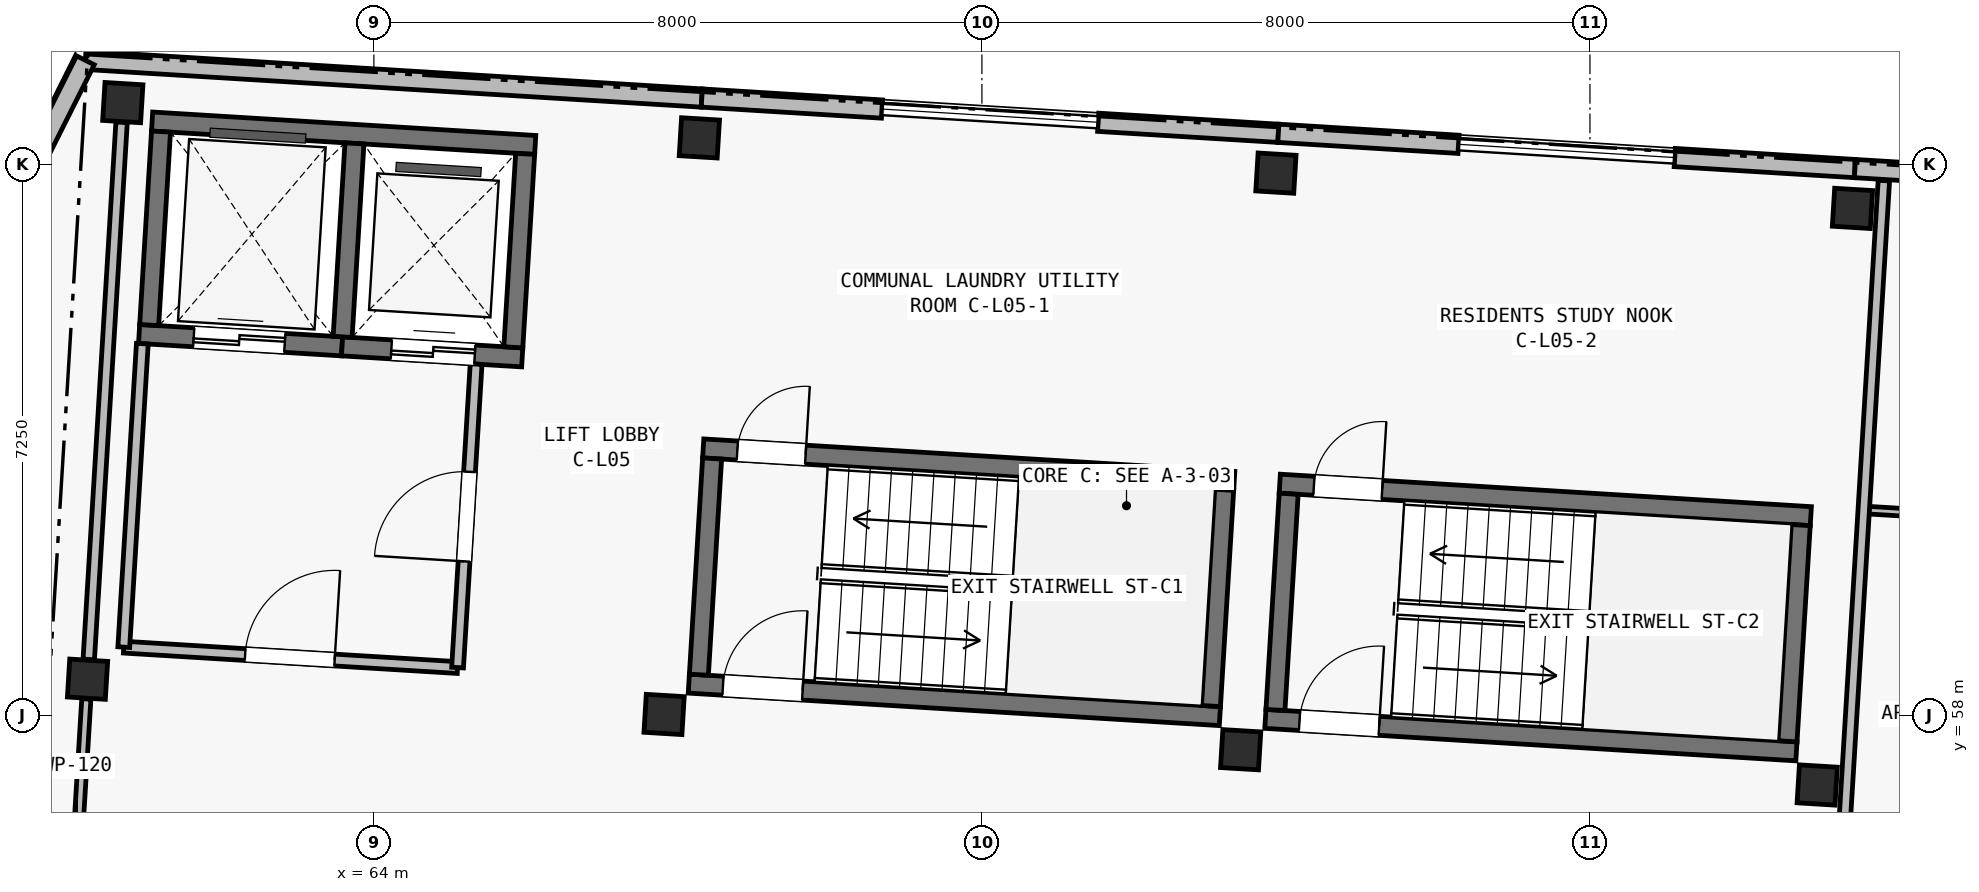
"""IFC4 building model, lengths in metres.
Left out: names, types, materials, properties, quantities, classifications, styles, units other than length and angle.
Written with IfcOpenShell. Run it as: python <this file> out.ifc"""

import sys

from ifc_helpers import new_model, si_unit, direction, frame, frame_2d, origin, origin_2d, place, context, subcontext, project, spatial, rectangle, extrude, element, fill, save


model = new_model("IFC4")
c1 = context("Model", 3, precision=1e-05, world=origin(), true_north=direction((0.0, 1.0)))
c2 = subcontext(c1, "Body", "Model", "MODEL_VIEW")
j1 = project(units=[si_unit("LENGTHUNIT", "METRE"), si_unit("PLANEANGLEUNIT", "RADIAN")], contexts=[c1])
p1 = place(None, origin())
s1 = spatial("IfcSite", under=j1, at=p1, CompositionType="ELEMENT")
p2 = place(p1, origin())
s2 = spatial("IfcBuilding", under=s1, at=p2, CompositionType="ELEMENT")
p3 = place(p2, frame((0.0, 0.0, 18.15)))
s3 = spatial("IfcBuildingStorey", under=s2, at=p3, CompositionType="ELEMENT", Elevation=18.15)
for number, where, z_axis, x_axis in (
    (1, (60.233, 58.478, 0.0), (0.0, 0.0, 1.0), (0.998, -0.061, 0.0)),
    (2, (60.697, 66.063, 0.0), (0.0, 0.0, 1.0), (0.998, -0.061, 0.0)),
    (3, (67.818, 58.014, 0.0), (0.0, 0.0, 1.0), (0.998, -0.061, 0.0)),
    (4, (68.282, 65.599, 0.0), (0.0, 0.0, 1.0), (0.998, -0.061, 0.0)),
    (5, (75.404, 57.55, 0.0), (0.0, 0.0, 1.0), (0.998, -0.061, 0.0)),
    (6, (75.868, 65.135, 0.0), (0.0, 0.0, 1.0), (0.998, -0.061, 0.0)),
    (7, (82.99, 57.086, 0.0), (0.0, 0.0, 1.0), (0.998, -0.061, 0.0)),
    (8, (83.454, 64.672, 0.0), (0.0, 0.0, 1.0), (0.998, -0.061, 0.0)),
):
    element("IfcColumn", number, at=place(p3, frame(where, z_axis=z_axis, x_axis=x_axis)), inside=s3, PredefinedType="COLUMN", context=c2, shape_type="SweptSolid", body=[
        extrude(rectangle(XDim=0.5, YDim=0.5, at=origin_2d()), origin(), (0.0, 0.0, 1.0), 3.25),
    ])
p4 = place(p3, frame((61.082, 65.814, 0.0), z_axis=(0.0, 0.0, 1.0), x_axis=(0.998134101522, -0.061059932685, 0.0)))
e9 = element("IfcWall", 9, at=p4, inside=s3, PredefinedType="SHEAR", context=c2, shape_type="SweptSolid", body=[
    extrude(rectangle(XDim=5.05, YDim=0.25, at=frame_2d((2.525, 0.0))), origin(), (0.0, 0.0, 1.0), 3.25),
])
p5 = place(p3, frame((60.911, 63.02, 0.0), z_axis=(0.0, 0.0, 1.0), x_axis=(0.998134099905, -0.061059959111, 0.0)))
e10 = element("IfcWall", 10, at=p5, inside=s3, PredefinedType="SHEAR", context=c2, shape_type="SweptSolid", body=[
    extrude(rectangle(XDim=2.675, YDim=0.25, at=frame_2d((1.337, 0.0))), origin(), (0.0, 0.0, 1.0), 3.25),
])
p6 = place(p5, frame((0.72, 0.0, 0.0)))
e11 = element("IfcOpeningElement", 11, at=p6, cuts=e10, PredefinedType="OPENING", context=c2, shape_type="SweptSolid", body=[
    extrude(rectangle(XDim=1.2, YDim=2.2, at=frame_2d((0.6, 1.1))), frame((0.0, 0.14, 0.0), z_axis=(0.0, -1.0, 0.0), x_axis=(1.0, 0.0, 0.0)), (0.0, 0.0, 1.0), 0.28),
])
p7 = place(p3, frame((63.581, 62.856, 0.0), z_axis=(0.0, 0.0, 1.0), x_axis=(0.998134103342, -0.061059902923, 0.0)))
e12 = element("IfcWall", 12, at=p7, inside=s3, PredefinedType="SHEAR", context=c2, shape_type="SweptSolid", body=[
    extrude(rectangle(XDim=2.375, YDim=0.25, at=frame_2d((1.188, 0.0))), origin(), (0.0, 0.0, 1.0), 3.25),
])
p8 = place(p7, frame((0.65, 0.0, 0.0)))
e13 = element("IfcOpeningElement", 13, at=p8, cuts=e12, PredefinedType="OPENING", context=c2, shape_type="SweptSolid", body=[
    extrude(rectangle(XDim=1.1, YDim=2.15, at=frame_2d((0.55, 1.075))), frame((0.0, 0.14, 0.0), z_axis=(0.0, -1.0, 0.0), x_axis=(1.0, 0.0, 0.0)), (0.0, 0.0, 1.0), 0.28),
])
p9 = place(p3, frame((61.043, 63.137, 0.0), z_axis=(0.0, 0.0, 1.0), x_axis=(0.061078919587, 0.998132939834, 0.0)))
e14 = element("IfcWall", 14, at=p9, inside=s3, PredefinedType="SHEAR", context=c2, shape_type="SweptSolid", body=[
    extrude(rectangle(XDim=2.55, YDim=0.25, at=frame_2d((1.275, 0.0))), origin(), (0.0, 0.0, 1.0), 3.25),
])
p10 = place(p3, frame((63.589, 62.981, 0.0), z_axis=(0.0, 0.0, 1.0), x_axis=(0.060989368901, 0.998138415692, 0.0)))
e15 = element("IfcWall", 15, at=p10, inside=s3, PredefinedType="SHEAR", context=c2, shape_type="SweptSolid", body=[
    extrude(rectangle(XDim=2.55, YDim=0.25, at=frame_2d((1.275, 0.0))), origin(), (0.0, 0.0, 1.0), 3.25),
])
p11 = place(p3, frame((65.834, 62.844, 0.0), z_axis=(0.0, 0.0, 1.0), x_axis=(0.061084756616, 0.998132582631, 0.0)))
e16 = element("IfcWall", 16, at=p11, inside=s3, PredefinedType="SHEAR", context=c2, shape_type="SweptSolid", body=[
    extrude(rectangle(XDim=2.55, YDim=0.25, at=frame_2d((1.275, 0.0))), origin(), (0.0, 0.0, 1.0), 3.25),
])
p12 = place(p3, frame((68.333, 61.514, 0.0), z_axis=(0.0, 0.0, 1.0), x_axis=(0.998135676081, -0.061034188237, 0.0)))
e17 = element("IfcWall", 17, at=p12, inside=s3, PredefinedType="SHEAR", context=c2, shape_type="SweptSolid", body=[
    extrude(rectangle(XDim=7.0, YDim=0.25, at=frame_2d((3.5, 0.0))), origin(), (0.0, 0.0, 1.0), 3.25),
])
p13 = place(p12, frame((0.45, 0.0, 0.0)))
e18 = element("IfcOpeningElement", 18, at=p13, cuts=e17, PredefinedType="OPENING", context=c2, shape_type="SweptSolid", body=[
    extrude(rectangle(XDim=0.9, YDim=2.1, at=frame_2d((0.45, 1.05))), frame((0.0, 0.14, 0.0), z_axis=(0.0, -1.0, 0.0), x_axis=(1.0, 0.0, 0.0)), (0.0, 0.0, 1.0), 0.28),
])
p14 = place(p3, frame((68.144, 58.419, 0.0), z_axis=(0.0, 0.0, 1.0), x_axis=(0.998135546153, -0.061036313012, 0.0)))
e19 = element("IfcWall", 19, at=p14, inside=s3, PredefinedType="SHEAR", context=c2, shape_type="SweptSolid", body=[
    extrude(rectangle(XDim=7.0, YDim=0.25, at=frame_2d((3.5, 0.0))), origin(), (0.0, 0.0, 1.0), 3.25),
])
p15 = place(p14, frame((0.45, 0.0, 0.0)))
e20 = element("IfcOpeningElement", 20, at=p15, cuts=e19, PredefinedType="OPENING", context=c2, shape_type="SweptSolid", body=[
    extrude(rectangle(XDim=1.05, YDim=2.15, at=frame_2d((0.525, 1.075))), frame((0.0, 0.14, 0.0), z_axis=(0.0, -1.0, 0.0), x_axis=(1.0, 0.0, 0.0)), (0.0, 0.0, 1.0), 0.28),
])
for number, where, z_axis, x_axis in (
    (21, (68.276, 58.537, 0.0), (0.0, 0.0, 1.0), (0.061, 0.998, 0.0)),
    (22, (75.014, 58.125, 0.0), (0.0, 0.0, 1.0), (0.061, 0.998, 0.0)),
):
    element("IfcWall", number, at=place(p3, frame(where, z_axis=z_axis, x_axis=x_axis)), inside=s3, PredefinedType="SHEAR", context=c2, shape_type="SweptSolid", body=[
        extrude(rectangle(XDim=2.85, YDim=0.25, at=frame_2d((1.425, 0.0))), origin(), (0.0, 0.0, 1.0), 3.25),
    ])
p16 = place(p3, frame((75.919, 61.05, 0.0), z_axis=(0.0, 0.0, 1.0), x_axis=(0.998135546153, -0.061036313012, 0.0)))
e23 = element("IfcWall", 23, at=p16, inside=s3, PredefinedType="SHEAR", context=c2, shape_type="SweptSolid", body=[
    extrude(rectangle(XDim=7.0, YDim=0.25, at=frame_2d((3.5, 0.0))), origin(), (0.0, 0.0, 1.0), 3.25),
])
p17 = place(p16, frame((0.45, 0.0, 0.0)))
e24 = element("IfcOpeningElement", 24, at=p17, cuts=e23, PredefinedType="OPENING", context=c2, shape_type="SweptSolid", body=[
    extrude(rectangle(XDim=0.9, YDim=2.1, at=frame_2d((0.45, 1.05))), frame((0.0, 0.14, 0.0), z_axis=(0.0, -1.0, 0.0), x_axis=(1.0, 0.0, 0.0)), (0.0, 0.0, 1.0), 0.28),
])
p18 = place(p3, frame((75.73, 57.956, 0.0), z_axis=(0.0, 0.0, 1.0), x_axis=(0.998135546153, -0.061036313012, 0.0)))
e25 = element("IfcWall", 25, at=p18, inside=s3, PredefinedType="SHEAR", context=c2, shape_type="SweptSolid", body=[
    extrude(rectangle(XDim=7.0, YDim=0.25, at=frame_2d((3.5, 0.0))), origin(), (0.0, 0.0, 1.0), 3.25),
])
p19 = place(p18, frame((0.45, 0.0, 0.0)))
e26 = element("IfcOpeningElement", 26, at=p19, cuts=e25, PredefinedType="OPENING", context=c2, shape_type="SweptSolid", body=[
    extrude(rectangle(XDim=1.05, YDim=2.15, at=frame_2d((0.525, 1.075))), frame((0.0, 0.14, 0.0), z_axis=(0.0, -1.0, 0.0), x_axis=(1.0, 0.0, 0.0)), (0.0, 0.0, 1.0), 0.28),
])
for number, where, z_axis, x_axis in (
    (27, (75.862, 58.073, 0.0), (0.0, 0.0, 1.0), (0.061, 0.998, 0.0)),
    (28, (82.599, 57.661, 0.0), (0.0, 0.0, 1.0), (0.061, 0.998, 0.0)),
):
    element("IfcWall", number, at=place(p3, frame(where, z_axis=z_axis, x_axis=x_axis)), inside=s3, PredefinedType="SHEAR", context=c2, shape_type="SweptSolid", body=[
        extrude(rectangle(XDim=2.85, YDim=0.25, at=frame_2d((1.425, 0.0))), origin(), (0.0, 0.0, 1.0), 3.25),
    ])
p20 = place(p3, frame((60.205, 66.62, 0.0), z_axis=(0.0, 0.0, 1.0), x_axis=(0.998134248939, -0.061057522844, 0.0)))
e29 = element("IfcWall", 29, at=p20, inside=s3, PredefinedType="SOLIDWALL", context=c2, shape_type="SweptSolid", body=[
    extrude(rectangle(XDim=8.125, YDim=0.24, at=frame_2d((4.062, 0.0))), origin(), (0.0, 0.0, 1.0), 3.0),
])
p21 = place(p3, frame((68.314, 66.124, 0.0), z_axis=(0.0, 0.0, 1.0), x_axis=(0.998134103342, -0.061059902923, 0.0)))
e30 = element("IfcWall", 30, at=p21, inside=s3, PredefinedType="SOLIDWALL", context=c2, shape_type="SweptSolid", body=[
    extrude(rectangle(XDim=2.375, YDim=0.24, at=frame_2d((1.188, 0.0))), origin(), (0.0, 0.0, 1.0), 3.0),
])
p22 = place(p3, frame((73.53, 65.804, 0.0), z_axis=(0.0, 0.0, 1.0), x_axis=(0.998133720034, -0.061066168473, 0.0)))
e31 = element("IfcWall", 31, at=p22, inside=s3, PredefinedType="SOLIDWALL", context=c2, shape_type="SweptSolid", body=[
    extrude(rectangle(XDim=2.375, YDim=0.24, at=frame_2d((1.188, 0.0))), origin(), (0.0, 0.0, 1.0), 3.0),
])
for number, where, z_axis, x_axis in (
    (32, (75.9, 65.659, 0.0), (0.0, 0.0, 1.0), (0.998, -0.061, 0.0)),
    (33, (81.115, 65.341, 0.0), (0.0, 0.0, 1.0), (0.998, -0.061, 0.0)),
):
    element("IfcWall", number, at=place(p3, frame(where, z_axis=z_axis, x_axis=x_axis)), inside=s3, PredefinedType="SOLIDWALL", context=c2, shape_type="SweptSolid", body=[
        extrude(rectangle(XDim=2.375, YDim=0.24, at=frame_2d((1.188, 0.0))), origin(), (0.0, 0.0, 1.0), 3.0),
    ])
p23 = place(p3, frame((83.486, 65.196, 0.0), z_axis=(0.0, 0.0, 1.0), x_axis=(0.998135669243, -0.061034300063, 0.0)))
e34 = element("IfcWall", 34, at=p23, inside=s3, PredefinedType="SOLIDWALL", context=c2, shape_type="SweptSolid", body=[
    extrude(rectangle(XDim=7.6, YDim=0.24, at=frame_2d((3.8, 0.0))), origin(), (0.0, 0.0, 1.0), 3.0),
])
p24 = place(p23, frame((1.807, 0.0, 0.44)))
e35 = element("IfcOpeningElement", 35, at=p24, cuts=e34, PredefinedType="OPENING", context=c2, shape_type="SweptSolid", body=[
    extrude(rectangle(XDim=0.74, YDim=2.26, at=frame_2d((0.37, 1.13))), frame((0.0, 0.135, 0.0), z_axis=(0.0, -1.0, 0.0), x_axis=(1.0, 0.0, 0.0)), (0.0, 0.0, 1.0), 0.27),
])
p25 = place(p23, frame((5.006, 0.0, 0.5)))
e36 = element("IfcOpeningElement", 36, at=p25, cuts=e34, PredefinedType="OPENING", context=c2, shape_type="SweptSolid", body=[
    extrude(rectangle(XDim=0.82, YDim=2.18, at=frame_2d((0.41, 1.09))), frame((0.0, 0.135, 0.0), z_axis=(0.0, -1.0, 0.0), x_axis=(1.0, 0.0, 0.0)), (0.0, 0.0, 1.0), 0.27),
])
p26 = place(p3, frame((51.654, 49.585, 0.0), z_axis=(0.0, 0.0, 1.0), x_axis=(0.448621989068, 0.893721607059, 0.0)))
e37 = element("IfcWall", 37, at=p26, inside=s3, PredefinedType="SOLIDWALL", context=c2, shape_type="SweptSolid", body=[
    extrude(rectangle(XDim=19.061, YDim=0.26, at=frame_2d((9.53, 0.0))), origin(), (0.0, 0.0, 1.0), 3.0),
])
p27 = place(p26, frame((2.63, 0.0, 0.52)))
e38 = element("IfcOpeningElement", 38, at=p27, cuts=e37, PredefinedType="OPENING", context=c2, shape_type="SweptSolid", body=[
    extrude(rectangle(XDim=0.82, YDim=2.18, at=frame_2d((0.41, 1.09))), frame((0.0, 0.145, 0.0), z_axis=(0.0, -1.0, 0.0), x_axis=(1.0, 0.0, 0.0)), (0.0, 0.0, 1.0), 0.29),
])
p28 = place(p26, frame((15.41, 0.0, 0.45)))
e39 = element("IfcOpeningElement", 39, at=p28, cuts=e37, PredefinedType="OPENING", context=c2, shape_type="SweptSolid", body=[
    extrude(rectangle(XDim=0.66, YDim=2.32, at=frame_2d((0.33, 1.16))), frame((0.0, 0.145, 0.0), z_axis=(0.0, -1.0, 0.0), x_axis=(1.0, 0.0, 0.0)), (0.0, 0.0, 1.0), 0.29),
])
p29 = place(p3, frame((60.709, 58.899, 0.0), z_axis=(0.0, 0.0, 1.0), x_axis=(0.998132276607, -0.061089756882, 0.0)))
e40 = element("IfcWall", 40, at=p29, inside=s3, PredefinedType="PARTITIONING", context=c2, shape_type="SweptSolid", body=[
    extrude(rectangle(XDim=4.4, YDim=0.155, at=frame_2d((2.2, 0.0))), origin(), (0.0, 0.0, 1.0), 2.97),
])
p30 = place(p29, frame((1.6, 0.0, 0.0)))
e41 = element("IfcOpeningElement", 41, at=p30, cuts=e40, PredefinedType="OPENING", context=c2, shape_type="SweptSolid", body=[
    extrude(rectangle(XDim=1.18, YDim=2.15, at=frame_2d((0.59, 1.075))), frame((0.0, 0.093, 0.0), z_axis=(0.0, -1.0, 0.0), x_axis=(1.0, 0.0, 0.0)), (0.0, 0.0, 1.0), 0.185),
])
p31 = place(p3, frame((60.709, 58.899, 0.0), z_axis=(0.0, 0.0, 1.0), x_axis=(0.061036844229, 0.998135513669, 0.0)))
e42 = element("IfcWall", 42, at=p31, inside=s3, PredefinedType="PARTITIONING", context=c2, shape_type="SweptSolid", body=[
    extrude(rectangle(XDim=4.0, YDim=0.155, at=frame_2d((2.0, 0.0))), origin(), (0.0, 0.0, 1.0), 2.97),
])
p32 = place(p3, frame((65.101, 58.631, 0.0), z_axis=(0.0, 0.0, 1.0), x_axis=(0.061033125904, 0.99813574104, 0.0)))
e43 = element("IfcWall", 43, at=p32, inside=s3, PredefinedType="PARTITIONING", context=c2, shape_type="SweptSolid", body=[
    extrude(rectangle(XDim=4.0, YDim=0.155, at=frame_2d((2.0, 0.0))), origin(), (0.0, 0.0, 1.0), 2.97),
])
p33 = place(p32, frame((1.4, 0.0, 0.0)))
e44 = element("IfcOpeningElement", 44, at=p33, cuts=e43, PredefinedType="OPENING", context=c2, shape_type="SweptSolid", body=[
    extrude(rectangle(XDim=1.18, YDim=2.15, at=frame_2d((0.59, 1.075))), frame((0.0, 0.093, 0.0), z_axis=(0.0, -1.0, 0.0), x_axis=(1.0, 0.0, 0.0)), (0.0, 0.0, 1.0), 0.185),
])
p34 = place(p3, frame((59.98, 54.345, 0.0), z_axis=(0.0, 0.0, 1.0), x_axis=(0.061101107425, 0.998131581843, 0.0)))
e45 = element("IfcWall", 45, at=p34, inside=s3, PredefinedType="PARTITIONING", context=c2, shape_type="SweptSolid", body=[
    extrude(rectangle(XDim=3.88, YDim=0.12, at=frame_2d((1.94, 0.0))), origin(), (0.0, 0.0, 1.0), 2.5),
])
p35 = place(p34, frame((1.35, 0.0, 0.0)))
e46 = element("IfcOpeningElement", 46, at=p35, cuts=e45, PredefinedType="OPENING", context=c2, shape_type="SweptSolid", body=[
    extrude(rectangle(XDim=0.9, YDim=2.1, at=frame_2d((0.45, 1.05))), frame((0.0, 0.075, 0.0), z_axis=(0.0, -1.0, 0.0), x_axis=(1.0, 0.0, 0.0)), (0.0, 0.0, 1.0), 0.15),
])
p36 = place(p3, frame((60.249, 58.737, 0.0), z_axis=(0.0, 0.0, 1.0), x_axis=(0.061034344288, 0.998135666539, 0.0)))
e47 = element("IfcWall", 47, at=p36, inside=s3, PredefinedType="PARTITIONING", context=c2, shape_type="SweptSolid", body=[
    extrude(rectangle(XDim=7.08, YDim=0.15, at=frame_2d((3.54, 0.0))), origin(), (0.0, 0.0, 1.0), 2.5),
])
p37 = place(p3, frame((83.602, 60.705, 0.0), z_axis=(0.0, 0.0, 1.0), x_axis=(0.998133617109, -0.061067850767, 0.0)))
e48 = element("IfcWall", 48, at=p37, inside=s3, PredefinedType="PARTITIONING", context=c2, shape_type="SweptSolid", body=[
    extrude(rectangle(XDim=3.41, YDim=0.1, at=frame_2d((1.705, 0.0))), origin(), (0.0, 0.0, 1.0), 2.97),
])
p38 = place(p37, frame((1.255, 0.0, 0.0)))
e49 = element("IfcOpeningElement", 49, at=p38, cuts=e48, PredefinedType="OPENING", context=c2, shape_type="SweptSolid", body=[
    extrude(rectangle(XDim=0.88, YDim=2.1, at=frame_2d((0.44, 1.05))), frame((0.0, 0.065, 0.0), z_axis=(0.0, -1.0, 0.0), x_axis=(1.0, 0.0, 0.0)), (0.0, 0.0, 1.0), 0.13),
])
p39 = place(p3, frame((83.265, 55.185, 0.0), z_axis=(0.0, 0.0, 1.0), x_axis=(0.061046193261, 0.998134941923, 0.0)))
e50 = element("IfcWall", 50, at=p39, inside=s3, PredefinedType="PARTITIONING", context=c2, shape_type="SweptSolid", body=[
    extrude(rectangle(XDim=9.87, YDim=0.15, at=frame_2d((4.935, 0.0))), origin(), (0.0, 0.0, 1.0), 2.97),
])
p40 = place(p30, origin())
e51 = element("IfcDoor", 51, at=p40, inside=s3, OperationType="SINGLE_SWING_RIGHT", PredefinedType="DOOR", context=c2, shape_type="SweptSolid", body=[
    extrude(rectangle(XDim=1.18, YDim=2.15, at=frame_2d((0.59, 1.075))), frame((0.0, 0.025, 0.0), z_axis=(0.0, -1.0, 0.0), x_axis=(1.0, 0.0, 0.0)), (0.0, 0.0, 1.0), 0.05),
])
fill(e41, e51)
p41 = place(p33, origin())
e52 = element("IfcDoor", 52, at=p41, inside=s3, OperationType="SINGLE_SWING_LEFT", PredefinedType="DOOR", context=c2, shape_type="SweptSolid", body=[
    extrude(rectangle(XDim=1.18, YDim=2.15, at=frame_2d((0.59, 1.075))), frame((0.0, 0.025, 0.0), z_axis=(0.0, -1.0, 0.0), x_axis=(1.0, 0.0, 0.0)), (0.0, 0.0, 1.0), 0.05),
])
fill(e44, e52)
p42 = place(p15, origin())
e53 = element("IfcDoor", 53, at=p42, inside=s3, OperationType="SINGLE_SWING_RIGHT", PredefinedType="DOOR", context=c2, shape_type="SweptSolid", body=[
    extrude(rectangle(XDim=1.05, YDim=2.15, at=frame_2d((0.525, 1.075))), frame((0.0, 0.025, 0.0), z_axis=(0.0, -1.0, 0.0), x_axis=(1.0, 0.0, 0.0)), (0.0, 0.0, 1.0), 0.05),
])
fill(e20, e53)
p43 = place(p13, origin())
e54 = element("IfcDoor", 54, at=p43, inside=s3, OperationType="SINGLE_SWING_RIGHT", PredefinedType="DOOR", context=c2, shape_type="SweptSolid", body=[
    extrude(rectangle(XDim=0.9, YDim=2.1, at=frame_2d((0.45, 1.05))), frame((0.0, 0.025, 0.0), z_axis=(0.0, -1.0, 0.0), x_axis=(1.0, 0.0, 0.0)), (0.0, 0.0, 1.0), 0.05),
])
fill(e18, e54)
p44 = place(p19, origin())
e55 = element("IfcDoor", 55, at=p44, inside=s3, OperationType="SINGLE_SWING_RIGHT", PredefinedType="DOOR", context=c2, shape_type="SweptSolid", body=[
    extrude(rectangle(XDim=1.05, YDim=2.15, at=frame_2d((0.525, 1.075))), frame((0.0, 0.025, 0.0), z_axis=(0.0, -1.0, 0.0), x_axis=(1.0, 0.0, 0.0)), (0.0, 0.0, 1.0), 0.05),
])
fill(e26, e55)
p45 = place(p17, origin())
e56 = element("IfcDoor", 56, at=p45, inside=s3, OperationType="SINGLE_SWING_RIGHT", PredefinedType="DOOR", context=c2, shape_type="SweptSolid", body=[
    extrude(rectangle(XDim=0.9, YDim=2.1, at=frame_2d((0.45, 1.05))), frame((0.0, 0.025, 0.0), z_axis=(0.0, -1.0, 0.0), x_axis=(1.0, 0.0, 0.0)), (0.0, 0.0, 1.0), 0.05),
])
fill(e24, e56)
p46 = place(p6, origin())
e57 = element("IfcDoor", 57, at=p46, inside=s3, OperationType="DOUBLE_DOOR_SLIDING", PredefinedType="DOOR", context=c2, shape_type="SweptSolid", body=[
    extrude(rectangle(XDim=1.2, YDim=2.2, at=frame_2d((0.6, 1.1))), frame((0.0, 0.025, 0.0), z_axis=(0.0, -1.0, 0.0), x_axis=(1.0, 0.0, 0.0)), (0.0, 0.0, 1.0), 0.05),
])
fill(e11, e57)
p47 = place(p8, origin())
e58 = element("IfcDoor", 58, at=p47, inside=s3, OperationType="DOUBLE_DOOR_SLIDING", PredefinedType="DOOR", context=c2, shape_type="SweptSolid", body=[
    extrude(rectangle(XDim=1.1, YDim=2.15, at=frame_2d((0.55, 1.075))), frame((0.0, 0.025, 0.0), z_axis=(0.0, -1.0, 0.0), x_axis=(1.0, 0.0, 0.0)), (0.0, 0.0, 1.0), 0.05),
])
fill(e13, e58)
save(model, sys.argv[1])
